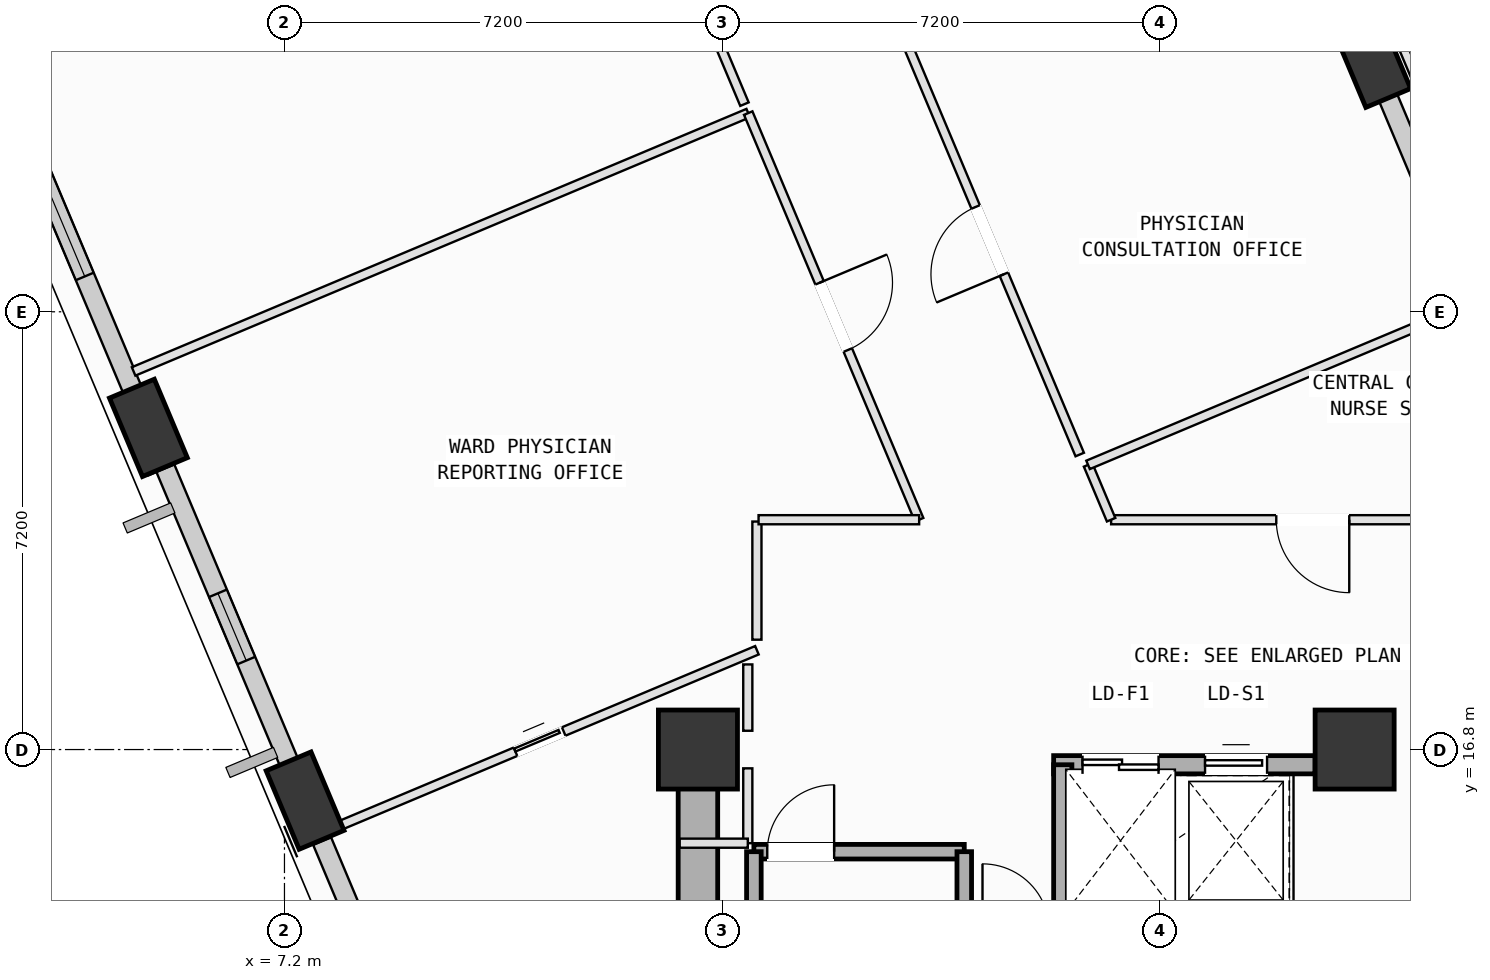
"""IFC4 building model, lengths in metres.
Left out: names, types, materials, properties, quantities, classifications, styles, units other than length and angle.
Written with IfcOpenShell. Run it as: python <this file> out.ifc"""

import sys

from ifc_helpers import new_model, si_unit, direction, frame, frame_2d, origin, origin_2d, place, context, subcontext, project, spatial, rectangle, extrude, element, fill, save


model = new_model("IFC4")
c1 = context("Model", 3, precision=1e-05, world=origin(), true_north=direction((0.0, 1.0)))
c2 = subcontext(c1, "Body", "Model", "MODEL_VIEW")
j1 = project(units=[si_unit("LENGTHUNIT", "METRE"), si_unit("PLANEANGLEUNIT", "RADIAN")], contexts=[c1])
p1 = place(None, origin())
s1 = spatial("IfcSite", under=j1, at=p1, CompositionType="ELEMENT")
p2 = place(p1, origin())
s2 = spatial("IfcBuilding", under=s1, at=p2, CompositionType="ELEMENT")
p3 = place(p2, frame((0.0, 0.0, 120.4)))
s3 = spatial("IfcBuildingStorey", under=s2, at=p3, CompositionType="ELEMENT", Elevation=120.4)
for number, where, z_axis, x_axis in (
    (1, (14.0, 16.8, 0.0), (0.0, 0.0, 1.0), (1.0, 0.0, 0.0)),
    (2, (24.8, 16.8, 0.0), (0.0, 0.0, 1.0), (1.0, 0.0, 0.0)),
):
    element("IfcColumn", number, at=place(p3, frame(where, z_axis=z_axis, x_axis=x_axis)), inside=s3, PredefinedType="COLUMN", context=c2, shape_type="SweptSolid", body=[
        extrude(rectangle(XDim=1.3, YDim=1.3, at=origin_2d()), origin(), (0.0, 0.0, 1.0), 4.0),
    ])
p4 = place(p3, frame((25.082, 28.162, 0.002), z_axis=(-0.013674542539, -0.035407297646, 0.999279405452), x_axis=(-0.029610655568, 0.998948888693, 0.034990382344)))
e3 = element("IfcColumn", 3, at=p4, inside=s3, PredefinedType="COLUMN", context=c2, shape_type="SweptSolid", body=[
    extrude(rectangle(XDim=1.4, YDim=0.8, at=origin_2d()), origin(), (0.0, 0.0, 1.0), 3.999),
])
p5 = place(p3, frame((4.962, 22.091, 0.002), z_axis=(0.012132234735, -0.117803999277, 0.992962751887), x_axis=(-0.479252206701, 0.870860755708, 0.109173561545)))
e4 = element("IfcColumn", 4, at=p5, inside=s3, PredefinedType="COLUMN", context=c2, shape_type="SweptSolid", body=[
    extrude(rectangle(XDim=1.4, YDim=0.8, at=origin_2d()), origin(), (0.0, 0.0, 1.0), 4.025),
])
p6 = place(p3, frame((7.539, 15.96, 0.002), z_axis=(0.037268092554, -0.107069894569, 0.993552780155), x_axis=(-0.66706793096, 0.737629715316, 0.104512097711)))
e5 = element("IfcColumn", 5, at=p6, inside=s3, PredefinedType="COLUMN", context=c2, shape_type="SweptSolid", body=[
    extrude(rectangle(XDim=1.4, YDim=0.8, at=origin_2d()), origin(), (0.0, 0.0, 1.0), 4.022),
])
p7 = place(p3, frame((25.294, 27.656, 0.0), z_axis=(0.0, 0.0, 1.0), x_axis=(0.387511216986, -0.921864988331, 0.0)))
e6 = element("IfcWall", 6, at=p7, inside=s3, PredefinedType="SOLIDWALL", context=c2, shape_type="SweptSolid", body=[
    extrude(rectangle(XDim=6.76, YDim=0.32, at=frame_2d((3.38, 0.0))), origin(), (0.0, 0.0, 1.0), 3.165),
])
p8 = place(p3, frame((4.86, 22.333, 0.0), z_axis=(0.0, 0.0, 1.0), x_axis=(-0.387490609288, 0.921873650623, 0.0)))
e7 = element("IfcWall", 7, at=p8, inside=s3, PredefinedType="SOLIDWALL", context=c2, shape_type="SweptSolid", body=[
    extrude(rectangle(XDim=5.628, YDim=0.32, at=frame_2d((2.814, 0.0))), origin(), (0.0, 0.0, 1.0), 3.165),
])
p9 = place(p8, frame((2.438, 0.0, 0.75)))
e8 = element("IfcOpeningElement", 8, at=p9, cuts=e7, PredefinedType="OPENING", context=c2, shape_type="SweptSolid", body=[
    extrude(rectangle(XDim=1.8, YDim=2.05, at=frame_2d((0.9, 1.025))), frame((0.0, 0.17, 0.0), z_axis=(0.0, -1.0, 0.0), x_axis=(1.0, 0.0, 0.0)), (0.0, 0.0, 1.0), 0.34),
])
p10 = place(p3, frame((7.435, 16.208, 0.0), z_axis=(0.0, 0.0, 1.0), x_axis=(-0.387540340387, 0.921852745601, 0.0)))
e9 = element("IfcWall", 9, at=p10, inside=s3, PredefinedType="SOLIDWALL", context=c2, shape_type="SweptSolid", body=[
    extrude(rectangle(XDim=5.662, YDim=0.32, at=frame_2d((2.831, 0.0))), origin(), (0.0, 0.0, 1.0), 3.165),
])
p11 = place(p10, frame((2.23, 0.0, 0.75)))
e10 = element("IfcOpeningElement", 10, at=p11, cuts=e9, PredefinedType="OPENING", context=c2, shape_type="SweptSolid", body=[
    extrude(rectangle(XDim=1.2, YDim=1.75, at=frame_2d((0.6, 0.875))), frame((0.0, 0.17, 0.0), z_axis=(0.0, -1.0, 0.0), x_axis=(1.0, 0.0, 0.0)), (0.0, 0.0, 1.0), 0.34),
])
p12 = place(p3, frame((10.672, 8.508, 0.0), z_axis=(0.0, 0.0, 1.0), x_axis=(-0.387524577065, 0.921859372231, 0.0)))
e11 = element("IfcWall", 11, at=p12, inside=s3, PredefinedType="SOLIDWALL", context=c2, shape_type="SweptSolid", body=[
    extrude(rectangle(XDim=7.36, YDim=0.32, at=frame_2d((3.68, 0.0))), origin(), (0.0, 0.0, 1.0), 3.165),
])
p13 = place(p12, frame((2.881, 0.0, 0.75)))
e12 = element("IfcOpeningElement", 12, at=p13, cuts=e11, PredefinedType="OPENING", context=c2, shape_type="SweptSolid", body=[
    extrude(rectangle(XDim=1.6, YDim=1.95, at=frame_2d((0.8, 0.975))), frame((0.0, 0.17, 0.0), z_axis=(0.0, -1.0, 0.0), x_axis=(1.0, 0.0, 0.0)), (0.0, 0.0, 1.0), 0.34),
])
p14 = place(p12, frame((0.576, 0.0, 0.75)))
e13 = element("IfcOpeningElement", 13, at=p14, cuts=e11, PredefinedType="OPENING", context=c2, shape_type="SweptSolid", body=[
    extrude(rectangle(XDim=1.6, YDim=1.95, at=frame_2d((0.8, 0.975))), frame((0.0, 0.17, 0.0), z_axis=(0.0, -1.0, 0.0), x_axis=(1.0, 0.0, 0.0)), (0.0, 0.0, 1.0), 0.34),
])
p15 = place(p3, frame((14.92, 15.12, 0.0), z_axis=(0.0, 0.0, 1.0), x_axis=(1.0, 0.0, 0.0)))
e14 = element("IfcWall", 14, at=p15, inside=s3, PredefinedType="SOLIDWALL", context=c2, shape_type="SweptSolid", body=[
    extrude(rectangle(XDim=3.46, YDim=0.24, at=frame_2d((1.73, 0.0))), origin(), (0.0, 0.0, 1.0), 3.78),
])
p16 = place(p15, frame((0.22, 0.0, 0.0)))
e15 = element("IfcOpeningElement", 15, at=p16, cuts=e14, PredefinedType="OPENING", context=c2, shape_type="SweptSolid", body=[
    extrude(rectangle(XDim=1.1, YDim=2.15, at=frame_2d((0.55, 1.075))), frame((0.0, 0.13, 0.0), z_axis=(0.0, -1.0, 0.0), x_axis=(1.0, 0.0, 0.0)), (0.0, 0.0, 1.0), 0.26),
])
for number, where, z_axis, x_axis in (
    (16, (18.38, 15.12, 0.0), (0.0, 0.0, 1.0), (0.0, -1.0, 0.0)),
    (17, (14.92, 8.125, 0.0), (0.0, 0.0, 1.0), (0.0, 1.0, 0.0)),
):
    element("IfcWall", number, at=place(p3, frame(where, z_axis=z_axis, x_axis=x_axis)), inside=s3, PredefinedType="SOLIDWALL", context=c2, shape_type="SweptSolid", body=[
        extrude(rectangle(XDim=6.995, YDim=0.24, at=frame_2d((3.498, 0.0))), origin(), (0.0, 0.0, 1.0), 3.78),
    ])
p17 = place(p3, frame((14.0, 16.8, 0.0), z_axis=(0.0, 0.0, 1.0), x_axis=(0.0, -1.0, 0.0)))
e18 = element("IfcWall", 18, at=p17, inside=s3, PredefinedType="SHEAR", context=c2, shape_type="SweptSolid", body=[
    extrude(rectangle(XDim=9.0, YDim=0.65, at=frame_2d((4.5, 0.0))), origin(), (0.0, 0.0, 1.0), 3.78),
])
p18 = place(p3, frame((19.85, 16.55, 0.0), z_axis=(0.0, 0.0, 1.0), x_axis=(1.0, 0.0, 0.0)))
e19 = element("IfcWall", 19, at=p18, inside=s3, PredefinedType="SOLIDWALL", context=c2, shape_type="SweptSolid", body=[
    extrude(rectangle(XDim=4.3, YDim=0.3, at=frame_2d((2.15, 0.0))), origin(), (0.0, 0.0, 1.0), 3.78),
])
p19 = place(p18, frame((0.475, 0.0, 0.0)))
e20 = element("IfcOpeningElement", 20, at=p19, cuts=e19, PredefinedType="OPENING", context=c2, shape_type="SweptSolid", body=[
    extrude(rectangle(XDim=1.25, YDim=2.18, at=frame_2d((0.625, 1.09))), frame((0.0, 0.16, 0.0), z_axis=(0.0, -1.0, 0.0), x_axis=(1.0, 0.0, 0.0)), (0.0, 0.0, 1.0), 0.32),
])
p20 = place(p18, frame((2.49, 0.0, 0.0)))
e21 = element("IfcOpeningElement", 21, at=p20, cuts=e19, PredefinedType="OPENING", context=c2, shape_type="SweptSolid", body=[
    extrude(rectangle(XDim=1.02, YDim=2.12, at=frame_2d((0.51, 1.06))), frame((0.0, 0.16, 0.0), z_axis=(0.0, -1.0, 0.0), x_axis=(1.0, 0.0, 0.0)), (0.0, 0.0, 1.0), 0.32),
])
p21 = place(p3, frame((20.0, 13.82, 0.0), z_axis=(0.0, 0.0, 1.0), x_axis=(0.0, 1.0, 0.0)))
e22 = element("IfcWall", 22, at=p21, inside=s3, PredefinedType="SOLIDWALL", context=c2, shape_type="SweptSolid", body=[
    extrude(rectangle(XDim=2.73, YDim=0.3, at=frame_2d((1.365, 0.0))), origin(), (0.0, 0.0, 1.0), 3.78),
])
p22 = place(p3, frame((14.82, 18.2, 0.0), z_axis=(0.0, 0.0, 1.0), x_axis=(0.0, -1.0, 0.0)))
e23 = element("IfcWall", 23, at=p22, inside=s3, PredefinedType="PARTITIONING", context=c2, shape_type="SweptSolid", body=[
    extrude(rectangle(XDim=1.091, YDim=0.15, at=frame_2d((0.545, 0.0))), origin(), (0.0, 0.0, 1.0), 3.78),
])
p23 = place(p3, frame((14.82, 16.491, 0.0), z_axis=(0.0, 0.0, 1.0), x_axis=(0.0, -1.0, 0.0)))
e24 = element("IfcWall", 24, at=p23, inside=s3, PredefinedType="PARTITIONING", context=c2, shape_type="SweptSolid", body=[
    extrude(rectangle(XDim=1.231, YDim=0.15, at=frame_2d((0.615, 0.0))), origin(), (0.0, 0.0, 1.0), 3.78),
])
p24 = place(p3, frame((14.82, 15.26, 0.0), z_axis=(0.0, 0.0, 1.0), x_axis=(-1.0, 0.0, 0.0)))
e25 = element("IfcWall", 25, at=p24, inside=s3, PredefinedType="PARTITIONING", context=c2, shape_type="SweptSolid", body=[
    extrude(rectangle(XDim=1.12, YDim=0.15, at=frame_2d((0.56, 0.0))), origin(), (0.0, 0.0, 1.0), 3.78),
])
p25 = place(p3, frame((7.822, 15.428, 0.0), z_axis=(0.0, 0.0, 1.0), x_axis=(0.921844455802, 0.387560058968, 0.0)))
e26 = element("IfcWall", 26, at=p25, inside=s3, PredefinedType="PARTITIONING", context=c2, shape_type="SweptSolid", body=[
    extrude(rectangle(XDim=7.754, YDim=0.15, at=frame_2d((3.877, 0.0))), origin(), (0.0, 0.0, 1.0), 3.78),
])
p26 = place(p25, frame((3.447, 0.0, 0.0)))
e27 = element("IfcOpeningElement", 27, at=p26, cuts=e26, PredefinedType="OPENING", context=c2, shape_type="SweptSolid", body=[
    extrude(rectangle(XDim=0.86, YDim=2.06, at=frame_2d((0.43, 1.03))), frame((0.0, 0.085, 0.0), z_axis=(0.0, -1.0, 0.0), x_axis=(1.0, 0.0, 0.0)), (0.0, 0.0, 1.0), 0.17),
])
p27 = place(p3, frame((14.97, 20.55, 0.0), z_axis=(0.0, 0.0, 1.0), x_axis=(0.0, -1.0, 0.0)))
e28 = element("IfcWall", 28, at=p27, inside=s3, PredefinedType="PARTITIONING", context=c2, shape_type="SweptSolid", body=[
    extrude(rectangle(XDim=1.943, YDim=0.15, at=frame_2d((0.972, 0.0))), origin(), (0.0, 0.0, 1.0), 3.78),
])
p28 = place(p3, frame((7.498, 15.466, 0.0), z_axis=(0.0, 0.0, 1.0), x_axis=(-0.386915874997, 0.922115017596, 0.0)))
e29 = element("IfcWall", 29, at=p28, inside=s3, PredefinedType="PARTITIONING", context=c2, shape_type="SweptSolid", body=[
    extrude(rectangle(XDim=0.708, YDim=0.15, at=frame_2d((0.354, 0.0))), origin(), (0.0, 0.0, 1.0), 3.165),
])
p29 = place(p3, frame((5.029, 21.338, 0.0), z_axis=(0.0, 0.0, 1.0), x_axis=(-0.38773494757, 0.921770909951, 0.0)))
e30 = element("IfcWall", 30, at=p29, inside=s3, PredefinedType="PARTITIONING", context=c2, shape_type="SweptSolid", body=[
    extrude(rectangle(XDim=0.983, YDim=0.15, at=frame_2d((0.491, 0.0))), origin(), (0.0, 0.0, 1.0), 3.165),
])
p30 = place(p3, frame((4.719, 23.019, 0.0), z_axis=(0.0, 0.0, 1.0), x_axis=(0.921861546859, 0.387519403931, 0.0)))
e31 = element("IfcWall", 31, at=p30, inside=s3, PredefinedType="PARTITIONING", context=c2, shape_type="SweptSolid", body=[
    extrude(rectangle(XDim=10.965, YDim=0.15, at=frame_2d((5.482, 0.0))), origin(), (0.0, 0.0, 1.0), 3.78),
])
p31 = place(p3, frame((14.827, 27.268, 0.0), z_axis=(0.0, 0.0, 1.0), x_axis=(0.387476197679, -0.921879708114, 0.0)))
e32 = element("IfcWall", 32, at=p31, inside=s3, PredefinedType="PARTITIONING", context=c2, shape_type="SweptSolid", body=[
    extrude(rectangle(XDim=7.255, YDim=0.15, at=frame_2d((3.627, 0.0))), origin(), (0.0, 0.0, 1.0), 3.78),
])
p32 = place(p31, frame((3.027, 0.0, 0.0)))
e33 = element("IfcOpeningElement", 33, at=p32, cuts=e32, PredefinedType="OPENING", context=c2, shape_type="SweptSolid", body=[
    extrude(rectangle(XDim=1.2, YDim=2.15, at=frame_2d((0.6, 1.075))), frame((0.0, 0.085, 0.0), z_axis=(0.0, -1.0, 0.0), x_axis=(1.0, 0.0, 0.0)), (0.0, 0.0, 1.0), 0.17),
])
p33 = place(p3, frame((17.638, 20.58, 0.0), z_axis=(0.0, 0.0, 1.0), x_axis=(-1.0, 0.0, 0.0)))
e34 = element("IfcWall", 34, at=p33, inside=s3, PredefinedType="PARTITIONING", context=c2, shape_type="SweptSolid", body=[
    extrude(rectangle(XDim=2.641, YDim=0.15, at=frame_2d((1.32, 0.0))), origin(), (0.0, 0.0, 1.0), 3.78),
])
p34 = place(p3, frame((11.649, 34.827, 0.0), z_axis=(0.0, 0.0, 1.0), x_axis=(0.387547881375, -0.921849575387, 0.0)))
e35 = element("IfcWall", 35, at=p34, inside=s3, PredefinedType="PARTITIONING", context=c2, shape_type="SweptSolid", body=[
    extrude(rectangle(XDim=8.04, YDim=0.15, at=frame_2d((4.02, 0.0))), origin(), (0.0, 0.0, 1.0), 3.78),
])
p35 = place(p34, frame((3.42, 0.0, 0.0)))
e36 = element("IfcOpeningElement", 36, at=p35, cuts=e35, PredefinedType="OPENING", context=c2, shape_type="SweptSolid", body=[
    extrude(rectangle(XDim=1.2, YDim=2.15, at=frame_2d((0.6, 1.075))), frame((0.0, 0.085, 0.0), z_axis=(0.0, -1.0, 0.0), x_axis=(1.0, 0.0, 0.0)), (0.0, 0.0, 1.0), 0.17),
])
p36 = place(p3, frame((27.428, 20.58, 0.0), z_axis=(0.0, 0.0, 1.0), x_axis=(-1.0, 0.0, 0.0)))
e37 = element("IfcWall", 37, at=p36, inside=s3, PredefinedType="PARTITIONING", context=c2, shape_type="SweptSolid", body=[
    extrude(rectangle(XDim=6.633, YDim=0.15, at=frame_2d((3.316, 0.0))), origin(), (0.0, 0.0, 1.0), 3.78),
])
p37 = place(p36, frame((2.717, 0.0, 0.0)))
e38 = element("IfcOpeningElement", 38, at=p37, cuts=e37, PredefinedType="OPENING", context=c2, shape_type="SweptSolid", body=[
    extrude(rectangle(XDim=1.2, YDim=2.15, at=frame_2d((0.6, 1.075))), frame((0.0, 0.085, 0.0), z_axis=(0.0, -1.0, 0.0), x_axis=(1.0, 0.0, 0.0)), (0.0, 0.0, 1.0), 0.17),
])
p38 = place(p3, frame((20.795, 20.58, 0.0), z_axis=(0.0, 0.0, 1.0), x_axis=(-0.387342801036, 0.921935764837, 0.0)))
e39 = element("IfcWall", 39, at=p38, inside=s3, PredefinedType="PARTITIONING", context=c2, shape_type="SweptSolid", body=[
    extrude(rectangle(XDim=0.978, YDim=0.15, at=frame_2d((0.489, 0.0))), origin(), (0.0, 0.0, 1.0), 3.78),
])
p39 = place(p3, frame((20.416, 21.482, 0.0), z_axis=(0.0, 0.0, 1.0), x_axis=(0.921833906967, 0.38758514931, 0.0)))
e40 = element("IfcWall", 40, at=p39, inside=s3, PredefinedType="PARTITIONING", context=c2, shape_type="SweptSolid", body=[
    extrude(rectangle(XDim=6.755, YDim=0.15, at=frame_2d((3.377, 0.0))), origin(), (0.0, 0.0, 1.0), 3.78),
])
p40 = place(p3, frame((20.279, 21.652, 0.0), z_axis=(0.0, 0.0, 1.0), x_axis=(-0.38757659616, 0.921837503093, 0.0)))
e41 = element("IfcWall", 41, at=p40, inside=s3, PredefinedType="PARTITIONING", context=c2, shape_type="SweptSolid", body=[
    extrude(rectangle(XDim=7.635, YDim=0.15, at=frame_2d((3.817, 0.0))), origin(), (0.0, 0.0, 1.0), 3.78),
])
p41 = place(p40, frame((3.217, 0.0, 0.0)))
e42 = element("IfcOpeningElement", 42, at=p41, cuts=e41, PredefinedType="OPENING", context=c2, shape_type="SweptSolid", body=[
    extrude(rectangle(XDim=1.2, YDim=2.15, at=frame_2d((0.6, 1.075))), frame((0.0, 0.085, 0.0), z_axis=(0.0, -1.0, 0.0), x_axis=(1.0, 0.0, 0.0)), (0.0, 0.0, 1.0), 0.17),
])
p42 = place(p3, frame((24.234, 31.597, 0.0), z_axis=(0.0, 0.0, 1.0), x_axis=(0.387558072008, -0.921845291153, 0.0)))
e43 = element("IfcWall", 43, at=p42, inside=s3, PredefinedType="PARTITIONING", context=c2, shape_type="SweptSolid", body=[
    extrude(rectangle(XDim=7.635, YDim=0.15, at=frame_2d((3.818, 0.0))), origin(), (0.0, 0.0, 1.0), 3.78),
])
p43 = place(p9, origin())
e44 = element("IfcWindow", 44, at=p43, inside=s3, PartitioningType="SINGLE_PANEL", PredefinedType="WINDOW", context=c2, shape_type="SweptSolid", body=[
    extrude(rectangle(XDim=1.8, YDim=2.05, at=frame_2d((0.9, 1.025))), frame((0.0, 0.03, 0.0), z_axis=(0.0, -1.0, 0.0), x_axis=(1.0, 0.0, 0.0)), (0.0, 0.0, 1.0), 0.06),
])
fill(e8, e44)
p44 = place(p11, origin())
e45 = element("IfcWindow", 45, at=p44, inside=s3, PartitioningType="SINGLE_PANEL", PredefinedType="WINDOW", context=c2, shape_type="SweptSolid", body=[
    extrude(rectangle(XDim=1.2, YDim=1.75, at=frame_2d((0.6, 0.875))), frame((0.0, 0.03, 0.0), z_axis=(0.0, -1.0, 0.0), x_axis=(1.0, 0.0, 0.0)), (0.0, 0.0, 1.0), 0.06),
])
fill(e10, e45)
p45 = place(p16, origin())
e46 = element("IfcDoor", 46, at=p45, inside=s3, OperationType="SINGLE_SWING_RIGHT", PredefinedType="DOOR", context=c2, shape_type="SweptSolid", body=[
    extrude(rectangle(XDim=1.1, YDim=2.15, at=frame_2d((0.55, 1.075))), frame((0.0, 0.025, 0.0), z_axis=(0.0, -1.0, 0.0), x_axis=(1.0, 0.0, 0.0)), (0.0, 0.0, 1.0), 0.05),
])
fill(e15, e46)
p46 = place(p19, origin())
e47 = element("IfcDoor", 47, at=p46, inside=s3, OperationType="DOUBLE_DOOR_SLIDING", PredefinedType="DOOR", context=c2, shape_type="SweptSolid", body=[
    extrude(rectangle(XDim=1.25, YDim=2.18, at=frame_2d((0.625, 1.09))), frame((0.0, 0.025, 0.0), z_axis=(0.0, -1.0, 0.0), x_axis=(1.0, 0.0, 0.0)), (0.0, 0.0, 1.0), 0.05),
])
fill(e20, e47)
p47 = place(p20, origin())
e48 = element("IfcDoor", 48, at=p47, inside=s3, OperationType="SLIDING_TO_LEFT", PredefinedType="DOOR", context=c2, shape_type="SweptSolid", body=[
    extrude(rectangle(XDim=1.02, YDim=2.12, at=frame_2d((0.51, 1.06))), frame((0.0, 0.025, 0.0), z_axis=(0.0, -1.0, 0.0), x_axis=(1.0, 0.0, 0.0)), (0.0, 0.0, 1.0), 0.05),
])
fill(e21, e48)
p48 = place(p32, origin())
e49 = element("IfcDoor", 49, at=p48, inside=s3, OperationType="SINGLE_SWING_LEFT", PredefinedType="DOOR", context=c2, shape_type="SweptSolid", body=[
    extrude(rectangle(XDim=1.2, YDim=2.15, at=frame_2d((0.6, 1.075))), frame((0.0, 0.025, 0.0), z_axis=(0.0, -1.0, 0.0), x_axis=(1.0, 0.0, 0.0)), (0.0, 0.0, 1.0), 0.05),
])
fill(e33, e49)
p49 = place(p37, origin())
e50 = element("IfcDoor", 50, at=p49, inside=s3, OperationType="SINGLE_SWING_LEFT", PredefinedType="DOOR", context=c2, shape_type="SweptSolid", body=[
    extrude(rectangle(XDim=1.2, YDim=2.15, at=frame_2d((0.6, 1.075))), frame((0.0, 0.025, 0.0), z_axis=(0.0, -1.0, 0.0), x_axis=(1.0, 0.0, 0.0)), (0.0, 0.0, 1.0), 0.05),
])
fill(e38, e50)
p50 = place(p41, origin())
e51 = element("IfcDoor", 51, at=p50, inside=s3, OperationType="SINGLE_SWING_LEFT", PredefinedType="DOOR", context=c2, shape_type="SweptSolid", body=[
    extrude(rectangle(XDim=1.2, YDim=2.15, at=frame_2d((0.6, 1.075))), frame((0.0, 0.025, 0.0), z_axis=(0.0, -1.0, 0.0), x_axis=(1.0, 0.0, 0.0)), (0.0, 0.0, 1.0), 0.05),
])
fill(e42, e51)
p51 = place(p26, origin())
e52 = element("IfcDoor", 52, at=p51, inside=s3, OperationType="SLIDING_TO_LEFT", PredefinedType="DOOR", context=c2, shape_type="SweptSolid", body=[
    extrude(rectangle(XDim=0.86, YDim=2.06, at=frame_2d((0.43, 1.03))), frame((0.0, 0.025, 0.0), z_axis=(0.0, -1.0, 0.0), x_axis=(1.0, 0.0, 0.0)), (0.0, 0.0, 1.0), 0.05),
])
fill(e27, e52)
save(model, sys.argv[1])
